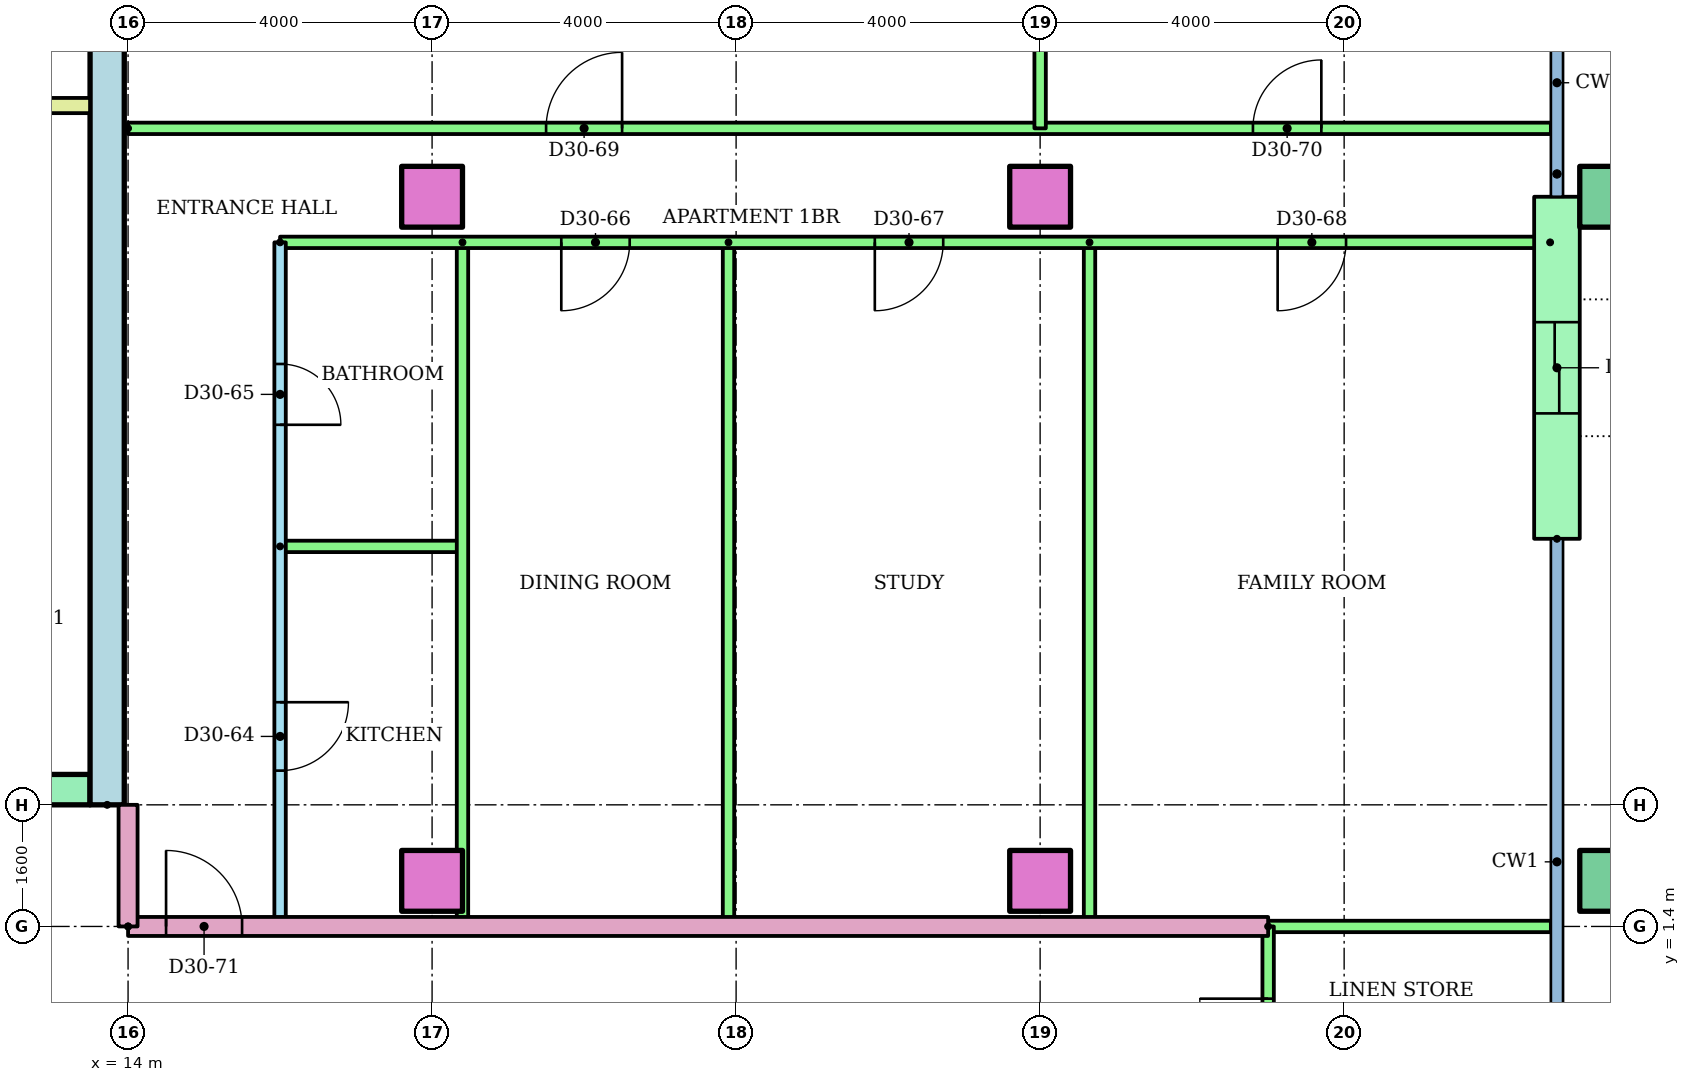
"""IFC4 building model, lengths in metres.
Left out: names, types, materials, properties, quantities, classifications, styles, units other than length and angle.
Written with IfcOpenShell. Run it as: python <this file> out.ifc"""

import sys

from ifc_helpers import new_model, si_unit, direction, frame, frame_2d, origin, origin_2d, place, context, subcontext, project, spatial, rectangle, hollow_rectangle, extrude, element, fill, save


model = new_model("IFC4")
c1 = context("Model", 3, precision=1e-05, world=origin(), true_north=direction((0.0, 1.0)))
c2 = subcontext(c1, "Body", "Model", "MODEL_VIEW")
j1 = project(units=[si_unit("LENGTHUNIT", "METRE"), si_unit("PLANEANGLEUNIT", "RADIAN")], contexts=[c1])
p1 = place(None, origin())
s1 = spatial("IfcSite", under=j1, at=p1, CompositionType="ELEMENT")
p2 = place(p1, origin())
s2 = spatial("IfcBuilding", under=s1, at=p2, CompositionType="ELEMENT")
p3 = place(p2, frame((0.0, 0.0, 119.8)))
s3 = spatial("IfcBuildingStorey", under=s2, at=p3, CompositionType="ELEMENT", Elevation=119.8)
for number, where in (
    (1, (18.0, 2.0, 0.0)),
    (2, (26.0, 2.0, 0.0)),
):
    element("IfcColumn", number, at=place(p3, frame(where)), inside=s3, PredefinedType="COLUMN", context=c2, shape_type="SweptSolid", body=[
        extrude(rectangle(XDim=0.8, YDim=0.8, at=origin_2d()), origin(), (0.0, 0.0, 1.0), 3.2),
    ])
p4 = place(p3, frame((33.5, 2.0, 0.0)))
e3 = element("IfcColumn", 3, at=p4, inside=s3, PredefinedType="COLUMN", context=c2, shape_type="SweptSolid", body=[
    extrude(hollow_rectangle(XDim=0.8, YDim=0.8, WallThickness=0.04, at=origin_2d()), origin(), (0.0, 0.0, 1.0), 3.2),
])
for number, where in (
    (4, (18.0, 11.0, 0.0)),
    (5, (26.0, 11.0, 0.0)),
):
    element("IfcColumn", number, at=place(p3, frame(where)), inside=s3, PredefinedType="COLUMN", context=c2, shape_type="SweptSolid", body=[
        extrude(rectangle(XDim=0.8, YDim=0.8, at=origin_2d()), origin(), (0.0, 0.0, 1.0), 3.2),
    ])
p5 = place(p3, frame((33.5, 11.0, 0.0)))
e6 = element("IfcColumn", 6, at=p5, inside=s3, PredefinedType="COLUMN", context=c2, shape_type="SweptSolid", body=[
    extrude(hollow_rectangle(XDim=0.8, YDim=0.8, WallThickness=0.04, at=origin_2d()), origin(), (0.0, 0.0, 1.0), 3.2),
])
p6 = place(p3, frame((32.8, 6.5, 0.0), z_axis=(0.0, 0.0, 1.0), x_axis=(0.0, 1.0, 0.0)))
e7 = element("IfcWall", 7, at=p6, inside=s3, PredefinedType="STANDARD", context=c2, shape_type="SweptSolid", body=[
    extrude(rectangle(XDim=4.5, YDim=0.6, at=frame_2d((2.25, 0.0))), origin(), (0.0, 0.0, 1.0), 2.92),
])
p7 = place(p6, frame((1.65, 0.0, 0.0)))
e8 = element("IfcOpeningElement", 8, at=p7, cuts=e7, PredefinedType="OPENING", context=c2, shape_type="SweptSolid", body=[
    extrude(rectangle(XDim=1.2, YDim=2.1, at=frame_2d((0.6, 1.05))), frame((0.0, 0.31, 0.0), z_axis=(0.0, -1.0, 0.0), x_axis=(1.0, 0.0, 0.0)), (0.0, 0.0, 1.0), 0.62),
])
p8 = place(p3, frame((13.725, 3.0, 0.0), z_axis=(0.0, 0.0, 1.0), x_axis=(0.0, 1.0, 0.0)))
e9 = element("IfcWall", 9, at=p8, inside=s3, PredefinedType="SHEAR", context=c2, shape_type="SweptSolid", body=[
    extrude(rectangle(XDim=17.0, YDim=0.45, at=frame_2d((8.5, 0.0))), origin(), (0.0, 0.0, 1.0), 2.92),
])
p9 = place(p3, frame((-13.5, 3.2, 0.0)))
e10 = element("IfcWall", 10, at=p9, inside=s3, PredefinedType="SHEAR", context=c2, shape_type="SweptSolid", body=[
    extrude(rectangle(XDim=27.0, YDim=0.4, at=frame_2d((13.5, 0.0))), origin(), (0.0, 0.0, 1.0), 2.92),
])
p10 = place(p9, frame((6.861, 0.0, 0.0)))
e11 = element("IfcOpeningElement", 11, at=p10, cuts=e10, PredefinedType="OPENING", context=c2, shape_type="SweptSolid", body=[
    extrude(rectangle(XDim=1.1, YDim=2.1, at=frame_2d((0.55, 1.05))), frame((0.0, 0.21, 0.0), z_axis=(0.0, -1.0, 0.0), x_axis=(1.0, 0.0, 0.0)), (0.0, 0.0, 1.0), 0.42),
])
p11 = place(p9, frame((9.906, 0.0, 0.0)))
e12 = element("IfcOpeningElement", 12, at=p11, cuts=e10, PredefinedType="OPENING", context=c2, shape_type="SweptSolid", body=[
    extrude(rectangle(XDim=1.1, YDim=2.1, at=frame_2d((0.55, 1.05))), frame((0.0, 0.21, 0.0), z_axis=(0.0, -1.0, 0.0), x_axis=(1.0, 0.0, 0.0)), (0.0, 0.0, 1.0), 0.42),
])
p12 = place(p9, frame((15.994, 0.0, 0.0)))
e13 = element("IfcOpeningElement", 13, at=p12, cuts=e10, PredefinedType="OPENING", context=c2, shape_type="SweptSolid", body=[
    extrude(rectangle(XDim=1.1, YDim=2.1, at=frame_2d((0.55, 1.05))), frame((0.0, 0.21, 0.0), z_axis=(0.0, -1.0, 0.0), x_axis=(1.0, 0.0, 0.0)), (0.0, 0.0, 1.0), 0.42),
])
p13 = place(p9, frame((19.039, 0.0, 0.0)))
e14 = element("IfcOpeningElement", 14, at=p13, cuts=e10, PredefinedType="OPENING", context=c2, shape_type="SweptSolid", body=[
    extrude(rectangle(XDim=1.1, YDim=2.1, at=frame_2d((0.55, 1.05))), frame((0.0, 0.21, 0.0), z_axis=(0.0, -1.0, 0.0), x_axis=(1.0, 0.0, 0.0)), (0.0, 0.0, 1.0), 0.42),
])
p14 = place(p9, frame((12.6, 0.0, 0.0)))
e15 = element("IfcOpeningElement", 15, at=p14, cuts=e10, PredefinedType="OPENING", context=c2, shape_type="SweptSolid", body=[
    extrude(rectangle(XDim=1.8, YDim=2.1, at=frame_2d((0.9, 1.05))), frame((0.0, 0.21, 0.0), z_axis=(0.0, -1.0, 0.0), x_axis=(1.0, 0.0, 0.0)), (0.0, 0.0, 1.0), 0.42),
])
p15 = place(p3, frame((9.6, 12.2, 0.0)))
e16 = element("IfcWall", 16, at=p15, inside=s3, PredefinedType="PARTITIONING", context=c2, shape_type="SweptSolid", body=[
    extrude(rectangle(XDim=3.9, YDim=0.2, at=frame_2d((1.95, 0.0))), origin(), (0.0, 0.0, 1.0), 2.92),
])
p16 = place(p3, frame((16.0, 10.4, 0.0), z_axis=(0.0, 0.0, 1.0), x_axis=(0.0, -1.0, 0.0)))
e17 = element("IfcWall", 17, at=p16, inside=s3, PredefinedType="PARTITIONING", context=c2, shape_type="SweptSolid", body=[
    extrude(rectangle(XDim=9.0, YDim=0.15, at=frame_2d((4.5, 0.0))), origin(), (0.0, 0.0, 1.0), 2.4),
])
p17 = place(p16, frame((6.05, 0.0, 0.0)))
e18 = element("IfcOpeningElement", 18, at=p17, cuts=e17, PredefinedType="OPENING", context=c2, shape_type="SweptSolid", body=[
    extrude(rectangle(XDim=0.9, YDim=2.1, at=frame_2d((0.45, 1.05))), frame((0.0, 0.085, 0.0), z_axis=(0.0, -1.0, 0.0), x_axis=(1.0, 0.0, 0.0)), (0.0, 0.0, 1.0), 0.17),
])
p18 = place(p16, frame((1.6, 0.0, 0.0)))
e19 = element("IfcOpeningElement", 19, at=p18, cuts=e17, PredefinedType="OPENING", context=c2, shape_type="SweptSolid", body=[
    extrude(rectangle(XDim=0.8, YDim=2.1, at=frame_2d((0.4, 1.05))), frame((0.0, 0.085, 0.0), z_axis=(0.0, -1.0, 0.0), x_axis=(1.0, 0.0, 0.0)), (0.0, 0.0, 1.0), 0.17),
])
p19 = place(p3, frame((16.0, 6.4, 0.0)))
e20 = element("IfcWall", 20, at=p19, inside=s3, PredefinedType="PARTITIONING", context=c2, shape_type="SweptSolid", body=[
    extrude(rectangle(XDim=2.4, YDim=0.15, at=frame_2d((1.2, 0.0))), origin(), (0.0, 0.0, 1.0), 2.4),
])
for number, where, z_axis, x_axis in (
    (21, (18.4, 10.4, 0.0), (0.0, 0.0, 1.0), (0.0, -1.0, 0.0)),
    (22, (21.9, 10.4, 0.0), (0.0, 0.0, 1.0), (0.0, -1.0, 0.0)),
    (23, (26.65, 10.4, 0.0), (0.0, 0.0, 1.0), (0.0, -1.0, 0.0)),
):
    element("IfcWall", number, at=place(p3, frame(where, z_axis=z_axis, x_axis=x_axis)), inside=s3, PredefinedType="PARTITIONING", context=c2, shape_type="SweptSolid", body=[
        extrude(rectangle(XDim=9.0, YDim=0.15, at=frame_2d((4.5, 0.0))), origin(), (0.0, 0.0, 1.0), 2.4),
    ])
p20 = place(p3, frame((32.71, 10.4, 0.0), z_axis=(0.0, 0.0, 1.0), x_axis=(-1.0, 0.0, 0.0)))
e24 = element("IfcWall", 24, at=p20, inside=s3, PredefinedType="PARTITIONING", context=c2, shape_type="SweptSolid", body=[
    extrude(rectangle(XDim=16.71, YDim=0.15, at=frame_2d((8.355, 0.0))), origin(), (0.0, 0.0, 1.0), 2.4),
])
p21 = place(p20, frame((12.11, 0.0, 0.0)))
e25 = element("IfcOpeningElement", 25, at=p21, cuts=e24, PredefinedType="OPENING", context=c2, shape_type="SweptSolid", body=[
    extrude(rectangle(XDim=0.9, YDim=2.1, at=frame_2d((0.45, 1.05))), frame((0.0, 0.085, 0.0), z_axis=(0.0, -1.0, 0.0), x_axis=(1.0, 0.0, 0.0)), (0.0, 0.0, 1.0), 0.17),
])
p22 = place(p20, frame((7.985, 0.0, 0.0)))
e26 = element("IfcOpeningElement", 26, at=p22, cuts=e24, PredefinedType="OPENING", context=c2, shape_type="SweptSolid", body=[
    extrude(rectangle(XDim=0.9, YDim=2.1, at=frame_2d((0.45, 1.05))), frame((0.0, 0.085, 0.0), z_axis=(0.0, -1.0, 0.0), x_axis=(1.0, 0.0, 0.0)), (0.0, 0.0, 1.0), 0.17),
])
p23 = place(p20, frame((2.685, 0.0, 0.0)))
e27 = element("IfcOpeningElement", 27, at=p23, cuts=e24, PredefinedType="OPENING", context=c2, shape_type="SweptSolid", body=[
    extrude(rectangle(XDim=0.9, YDim=2.1, at=frame_2d((0.45, 1.05))), frame((0.0, 0.085, 0.0), z_axis=(0.0, -1.0, 0.0), x_axis=(1.0, 0.0, 0.0)), (0.0, 0.0, 1.0), 0.17),
])
p24 = place(p3, frame((14.0, 11.9, 0.0)))
e28 = element("IfcWall", 28, at=p24, inside=s3, PredefinedType="PARTITIONING", context=c2, shape_type="SweptSolid", body=[
    extrude(rectangle(XDim=18.72, YDim=0.15, at=frame_2d((9.36, 0.0))), origin(), (0.0, 0.0, 1.0), 2.4),
])
p25 = place(p24, frame((5.5, 0.0, 0.0)))
e29 = element("IfcOpeningElement", 29, at=p25, cuts=e28, PredefinedType="OPENING", context=c2, shape_type="SweptSolid", body=[
    extrude(rectangle(XDim=1.0, YDim=2.1, at=frame_2d((0.5, 1.05))), frame((0.0, 0.085, 0.0), z_axis=(0.0, -1.0, 0.0), x_axis=(1.0, 0.0, 0.0)), (0.0, 0.0, 1.0), 0.17),
])
p26 = place(p24, frame((14.8, 0.0, 0.0)))
e30 = element("IfcOpeningElement", 30, at=p26, cuts=e28, PredefinedType="OPENING", context=c2, shape_type="SweptSolid", body=[
    extrude(rectangle(XDim=0.9, YDim=2.1, at=frame_2d((0.45, 1.05))), frame((0.0, 0.085, 0.0), z_axis=(0.0, -1.0, 0.0), x_axis=(1.0, 0.0, 0.0)), (0.0, 0.0, 1.0), 0.17),
])
p27 = place(p3, frame((26.0, 18.721, 0.0), z_axis=(0.0, 0.0, 1.0), x_axis=(0.0, -1.0, 0.0)))
e31 = element("IfcWall", 31, at=p27, inside=s3, PredefinedType="PARTITIONING", context=c2, shape_type="SweptSolid", body=[
    extrude(rectangle(XDim=6.821, YDim=0.15, at=frame_2d((3.411, 0.0))), origin(), (0.0, 0.0, 1.0), 2.4),
])
p28 = place(p3, frame((14.0, 1.4, 0.0)))
e32 = element("IfcWall", 32, at=p28, inside=s3, PredefinedType="PARTITIONING", context=c2, shape_type="SweptSolid", body=[
    extrude(rectangle(XDim=15.0, YDim=0.25, at=frame_2d((7.5, 0.0))), origin(), (0.0, 0.0, 1.0), 2.4),
])
p29 = place(p28, frame((0.5, 0.0, 0.0)))
e33 = element("IfcOpeningElement", 33, at=p29, cuts=e32, PredefinedType="OPENING", context=c2, shape_type="SweptSolid", body=[
    extrude(rectangle(XDim=1.0, YDim=2.1, at=frame_2d((0.5, 1.05))), frame((0.0, 0.135, 0.0), z_axis=(0.0, -1.0, 0.0), x_axis=(1.0, 0.0, 0.0)), (0.0, 0.0, 1.0), 0.27),
])
p30 = place(p3, frame((29.0, 1.4, 0.0)))
e34 = element("IfcWall", 34, at=p30, inside=s3, PredefinedType="PARTITIONING", context=c2, shape_type="SweptSolid", body=[
    extrude(rectangle(XDim=3.72, YDim=0.15, at=frame_2d((1.86, 0.0))), origin(), (0.0, 0.0, 1.0), 2.4),
])
p31 = place(p3, frame((29.0, -1.4, 0.0), z_axis=(0.0, 0.0, 1.0), x_axis=(0.0, 1.0, 0.0)))
e35 = element("IfcWall", 35, at=p31, inside=s3, PredefinedType="PARTITIONING", context=c2, shape_type="SweptSolid", body=[
    extrude(rectangle(XDim=2.8, YDim=0.15, at=frame_2d((1.4, 0.0))), origin(), (0.0, 0.0, 1.0), 2.4),
])
p32 = place(p31, frame((0.95, 0.0, 0.0)))
e36 = element("IfcOpeningElement", 36, at=p32, cuts=e35, PredefinedType="OPENING", context=c2, shape_type="SweptSolid", body=[
    extrude(rectangle(XDim=0.9, YDim=2.1, at=frame_2d((0.45, 1.05))), frame((0.0, 0.085, 0.0), z_axis=(0.0, -1.0, 0.0), x_axis=(1.0, 0.0, 0.0)), (0.0, 0.0, 1.0), 0.17),
])
p33 = place(p3, frame((14.0, 1.4, 0.0), z_axis=(0.0, 0.0, 1.0), x_axis=(0.0, 1.0, 0.0)))
e37 = element("IfcWall", 37, at=p33, inside=s3, PredefinedType="PARTITIONING", context=c2, shape_type="SweptSolid", body=[
    extrude(rectangle(XDim=1.6, YDim=0.25, at=frame_2d((0.8, 0.0))), origin(), (0.0, 0.0, 1.0), 2.4),
])
p34 = place(p17, origin())
e38 = element("IfcDoor", 38, at=p34, inside=s3, OperationType="SINGLE_SWING_LEFT", PredefinedType="DOOR", context=c2, shape_type="SweptSolid", body=[
    extrude(rectangle(XDim=0.9, YDim=2.1, at=frame_2d((0.45, 1.05))), frame((0.0, 0.025, 0.0), z_axis=(0.0, -1.0, 0.0), x_axis=(1.0, 0.0, 0.0)), (0.0, 0.0, 1.0), 0.05),
])
fill(e18, e38)
p35 = place(p18, origin())
e39 = element("IfcDoor", 39, at=p35, inside=s3, OperationType="SINGLE_SWING_RIGHT", PredefinedType="DOOR", context=c2, shape_type="SweptSolid", body=[
    extrude(rectangle(XDim=0.8, YDim=2.1, at=frame_2d((0.4, 1.05))), frame((0.0, 0.025, 0.0), z_axis=(0.0, -1.0, 0.0), x_axis=(1.0, 0.0, 0.0)), (0.0, 0.0, 1.0), 0.05),
])
fill(e19, e39)
p36 = place(p21, origin())
e40 = element("IfcDoor", 40, at=p36, inside=s3, OperationType="SINGLE_SWING_RIGHT", PredefinedType="DOOR", context=c2, shape_type="SweptSolid", body=[
    extrude(rectangle(XDim=0.9, YDim=2.1, at=frame_2d((0.45, 1.05))), frame((0.0, 0.025, 0.0), z_axis=(0.0, -1.0, 0.0), x_axis=(1.0, 0.0, 0.0)), (0.0, 0.0, 1.0), 0.05),
])
fill(e25, e40)
p37 = place(p22, origin())
e41 = element("IfcDoor", 41, at=p37, inside=s3, OperationType="SINGLE_SWING_RIGHT", PredefinedType="DOOR", context=c2, shape_type="SweptSolid", body=[
    extrude(rectangle(XDim=0.9, YDim=2.1, at=frame_2d((0.45, 1.05))), frame((0.0, 0.025, 0.0), z_axis=(0.0, -1.0, 0.0), x_axis=(1.0, 0.0, 0.0)), (0.0, 0.0, 1.0), 0.05),
])
fill(e26, e41)
p38 = place(p23, origin())
e42 = element("IfcDoor", 42, at=p38, inside=s3, OperationType="SINGLE_SWING_RIGHT", PredefinedType="DOOR", context=c2, shape_type="SweptSolid", body=[
    extrude(rectangle(XDim=0.9, YDim=2.1, at=frame_2d((0.45, 1.05))), frame((0.0, 0.025, 0.0), z_axis=(0.0, -1.0, 0.0), x_axis=(1.0, 0.0, 0.0)), (0.0, 0.0, 1.0), 0.05),
])
fill(e27, e42)
p39 = place(p25, origin())
e43 = element("IfcDoor", 43, at=p39, inside=s3, OperationType="SINGLE_SWING_RIGHT", PredefinedType="DOOR", context=c2, shape_type="SweptSolid", body=[
    extrude(rectangle(XDim=1.0, YDim=2.1, at=frame_2d((0.5, 1.05))), frame((0.0, 0.025, 0.0), z_axis=(0.0, -1.0, 0.0), x_axis=(1.0, 0.0, 0.0)), (0.0, 0.0, 1.0), 0.05),
])
fill(e29, e43)
p40 = place(p26, origin())
e44 = element("IfcDoor", 44, at=p40, inside=s3, OperationType="SINGLE_SWING_RIGHT", PredefinedType="DOOR", context=c2, shape_type="SweptSolid", body=[
    extrude(rectangle(XDim=0.9, YDim=2.1, at=frame_2d((0.45, 1.05))), frame((0.0, 0.025, 0.0), z_axis=(0.0, -1.0, 0.0), x_axis=(1.0, 0.0, 0.0)), (0.0, 0.0, 1.0), 0.05),
])
fill(e30, e44)
p41 = place(p29, origin())
e45 = element("IfcDoor", 45, at=p41, inside=s3, OperationType="SINGLE_SWING_LEFT", PredefinedType="DOOR", context=c2, shape_type="SweptSolid", body=[
    extrude(rectangle(XDim=1.0, YDim=2.1, at=frame_2d((0.5, 1.05))), frame((0.0, 0.025, 0.0), z_axis=(0.0, -1.0, 0.0), x_axis=(1.0, 0.0, 0.0)), (0.0, 0.0, 1.0), 0.05),
])
fill(e33, e45)
p42 = place(p32, origin())
e46 = element("IfcDoor", 46, at=p42, inside=s3, OperationType="SINGLE_SWING_RIGHT", PredefinedType="DOOR", context=c2, shape_type="SweptSolid", body=[
    extrude(rectangle(XDim=0.9, YDim=2.1, at=frame_2d((0.45, 1.05))), frame((0.0, 0.025, 0.0), z_axis=(0.0, -1.0, 0.0), x_axis=(1.0, 0.0, 0.0)), (0.0, 0.0, 1.0), 0.05),
])
fill(e36, e46)
p43 = place(p7, origin())
e47 = element("IfcDoor", 47, at=p43, inside=s3, OperationType="SLIDING_TO_LEFT", PredefinedType="DOOR", context=c2, shape_type="SweptSolid", body=[
    extrude(rectangle(XDim=1.2, YDim=2.1, at=frame_2d((0.6, 1.05))), frame((0.0, 0.025, 0.0), z_axis=(0.0, -1.0, 0.0), x_axis=(1.0, 0.0, 0.0)), (0.0, 0.0, 1.0), 0.05),
])
fill(e8, e47)
save(model, sys.argv[1])
